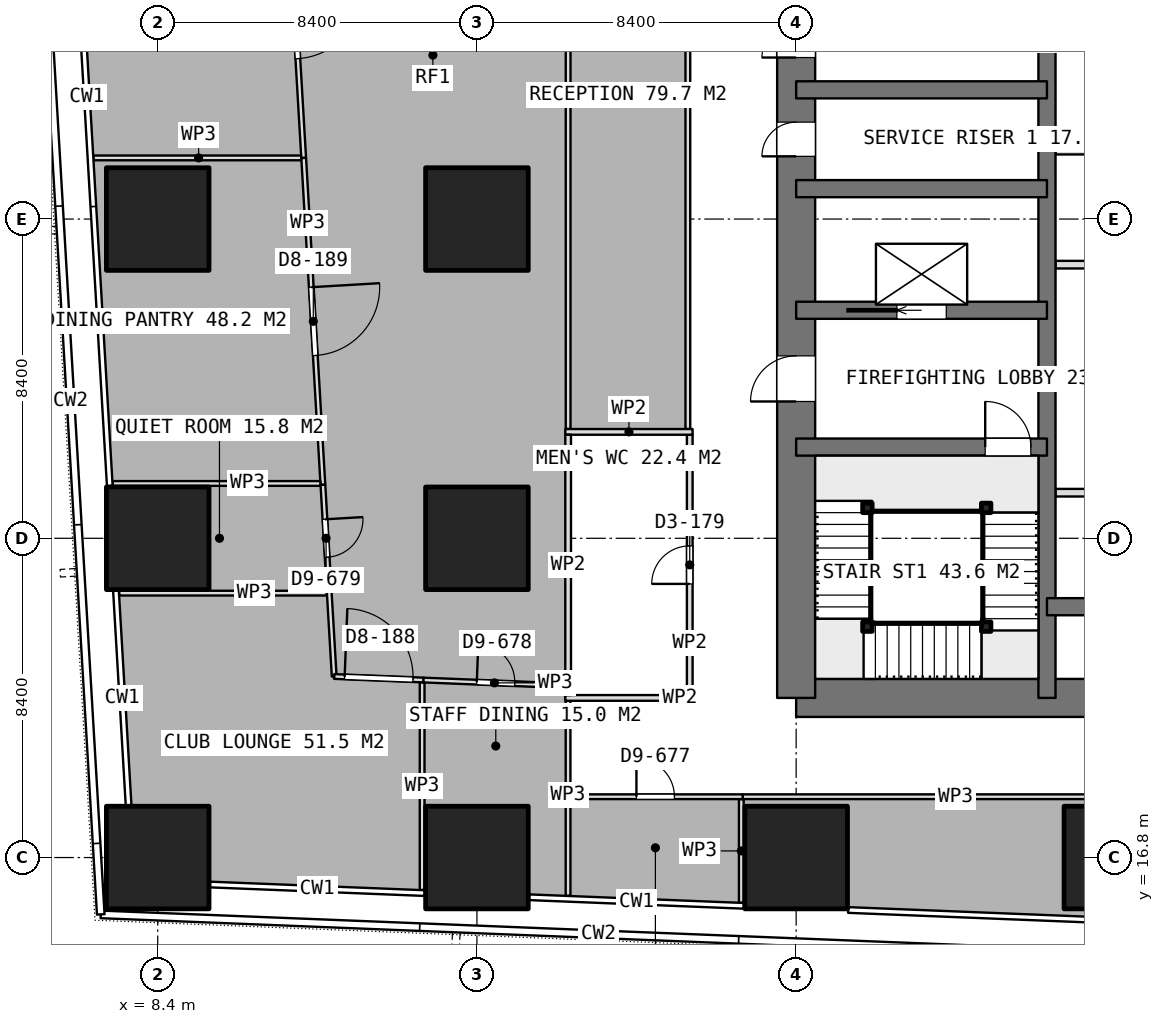
"""IFC4 building model, lengths in metres.
Left out: names, types, materials, properties, quantities, classifications, styles, units other than length and angle.
Written with IfcOpenShell. Run it as: python <this file> out.ifc"""

import sys

from ifc_helpers import new_model, si_unit, direction, frame, frame_2d, origin, origin_2d, place, context, subcontext, project, spatial, rectangle, extrude, element, fill, save


model = new_model("IFC4")
c1 = context("Model", 3, precision=1e-05, world=origin(), true_north=direction((0.0, 1.0)))
c2 = subcontext(c1, "Body", "Model", "MODEL_VIEW")
j1 = project(units=[si_unit("LENGTHUNIT", "METRE"), si_unit("PLANEANGLEUNIT", "RADIAN")], contexts=[c1])
p1 = place(None, origin())
s1 = spatial("IfcSite", under=j1, at=p1, CompositionType="ELEMENT")
p2 = place(p1, origin())
s2 = spatial("IfcBuilding", under=s1, at=p2, CompositionType="ELEMENT")
p3 = place(p2, frame((0.0, 0.0, 172.7)))
s3 = spatial("IfcBuildingStorey", under=s2, at=p3, CompositionType="ELEMENT", Elevation=172.7)
p4 = place(p3, frame((25.2, 21.0, 0.0), z_axis=(0.0, 0.0, 1.0), x_axis=(1.0, 0.0, 0.0)))
e1 = element("IfcWall", 1, at=p4, inside=s3, PredefinedType="SHEAR", context=c2, shape_type="SweptSolid", body=[
    extrude(rectangle(XDim=10.4, YDim=1.0, at=frame_2d((5.2, 0.0))), origin(), (0.0, 0.0, 1.0), 3.75),
])
p5 = place(p3, frame((25.2, 21.0, 0.0), z_axis=(0.0, 0.0, 1.0), x_axis=(0.0, 1.0, 0.0)))
e2 = element("IfcWall", 2, at=p5, inside=s3, PredefinedType="SHEAR", context=c2, shape_type="SweptSolid", body=[
    extrude(rectangle(XDim=25.2, YDim=1.0, at=frame_2d((12.6, 0.0))), origin(), (0.0, 0.0, 1.0), 3.75),
])
p6 = place(p5, frame((7.8, 0.0, 0.0)))
e3 = element("IfcOpeningElement", 3, at=p6, cuts=e2, PredefinedType="OPENING", context=c2, shape_type="SweptSolid", body=[
    extrude(rectangle(XDim=1.2, YDim=2.1, at=frame_2d((0.6, 1.05))), frame((0.0, 0.51, 0.0), z_axis=(0.0, -1.0, 0.0), x_axis=(1.0, 0.0, 0.0)), (0.0, 0.0, 1.0), 1.02),
])
p7 = place(p5, frame((14.25, 0.0, 0.0)))
e4 = element("IfcOpeningElement", 4, at=p7, cuts=e2, PredefinedType="OPENING", context=c2, shape_type="SweptSolid", body=[
    extrude(rectangle(XDim=0.9, YDim=2.1, at=frame_2d((0.45, 1.05))), frame((0.0, 0.51, 0.0), z_axis=(0.0, -1.0, 0.0), x_axis=(1.0, 0.0, 0.0)), (0.0, 0.0, 1.0), 1.02),
])
p8 = place(p5, frame((16.85, 0.0, 0.0)))
e5 = element("IfcOpeningElement", 5, at=p8, cuts=e2, PredefinedType="OPENING", context=c2, shape_type="SweptSolid", body=[
    extrude(rectangle(XDim=0.9, YDim=2.1, at=frame_2d((0.45, 1.05))), frame((0.0, 0.51, 0.0), z_axis=(0.0, -1.0, 0.0), x_axis=(1.0, 0.0, 0.0)), (0.0, 0.0, 1.0), 1.02),
])
p9 = place(p5, frame((19.025, 0.0, 0.0)))
e6 = element("IfcOpeningElement", 6, at=p9, cuts=e2, PredefinedType="OPENING", context=c2, shape_type="SweptSolid", body=[
    extrude(rectangle(XDim=1.2, YDim=2.1, at=frame_2d((0.6, 1.05))), frame((0.0, 0.51, 0.0), z_axis=(0.0, -1.0, 0.0), x_axis=(1.0, 0.0, 0.0)), (0.0, 0.0, 1.0), 1.02),
])
p10 = place(p3, frame((31.8, 21.0, 0.0), z_axis=(0.0, 0.0, 1.0), x_axis=(0.0, 1.0, 0.0)))
e7 = element("IfcWall", 7, at=p10, inside=s3, PredefinedType="SHEAR", context=c2, shape_type="SweptSolid", body=[
    extrude(rectangle(XDim=25.2, YDim=0.45, at=frame_2d((12.6, 0.0))), origin(), (0.0, 0.0, 1.0), 3.75),
])
p11 = place(p3, frame((31.8, 23.4, 0.0), z_axis=(0.0, 0.0, 1.0), x_axis=(1.0, 0.0, 0.0)))
e8 = element("IfcWall", 8, at=p11, inside=s3, PredefinedType="SHEAR", context=c2, shape_type="SweptSolid", body=[
    extrude(rectangle(XDim=3.8, YDim=0.45, at=frame_2d((1.9, 0.0))), origin(), (0.0, 0.0, 1.0), 3.75),
])
p12 = place(p3, frame((25.2, 27.6, 0.0), z_axis=(0.0, 0.0, 1.0), x_axis=(1.0, 0.0, 0.0)))
e9 = element("IfcWall", 9, at=p12, inside=s3, PredefinedType="SHEAR", context=c2, shape_type="SweptSolid", body=[
    extrude(rectangle(XDim=6.6, YDim=0.45, at=frame_2d((3.3, 0.0))), origin(), (0.0, 0.0, 1.0), 3.75),
])
p13 = place(p12, frame((4.975, 0.0, 0.0)))
e10 = element("IfcOpeningElement", 10, at=p13, cuts=e9, PredefinedType="OPENING", context=c2, shape_type="SweptSolid", body=[
    extrude(rectangle(XDim=1.2, YDim=2.1, at=frame_2d((0.6, 1.05))), frame((0.0, 0.235, 0.0), z_axis=(0.0, -1.0, 0.0), x_axis=(1.0, 0.0, 0.0)), (0.0, 0.0, 1.0), 0.47),
])
p14 = place(p3, frame((25.2, 31.2, 0.0), z_axis=(0.0, 0.0, 1.0), x_axis=(1.0, 0.0, 0.0)))
e11 = element("IfcWall", 11, at=p14, inside=s3, PredefinedType="SHEAR", context=c2, shape_type="SweptSolid", body=[
    extrude(rectangle(XDim=6.6, YDim=0.45, at=frame_2d((3.3, 0.0))), origin(), (0.0, 0.0, 1.0), 3.75),
])
p15 = place(p14, frame((2.65, 0.0, 0.0)))
e12 = element("IfcOpeningElement", 12, at=p15, cuts=e11, PredefinedType="OPENING", context=c2, shape_type="SweptSolid", body=[
    extrude(rectangle(XDim=1.3, YDim=2.1, at=frame_2d((0.65, 1.05))), frame((0.0, 0.235, 0.0), z_axis=(0.0, -1.0, 0.0), x_axis=(1.0, 0.0, 0.0)), (0.0, 0.0, 1.0), 0.47),
])
for number, where, z_axis, x_axis in (
    (13, (25.2, 34.4, 0.0), (0.0, 0.0, 1.0), (1.0, 0.0, 0.0)),
    (14, (25.2, 37.0, 0.0), (0.0, 0.0, 1.0), (1.0, 0.0, 0.0)),
):
    element("IfcWall", number, at=place(p3, frame(where, z_axis=z_axis, x_axis=x_axis)), inside=s3, PredefinedType="SHEAR", context=c2, shape_type="SweptSolid", body=[
        extrude(rectangle(XDim=6.6, YDim=0.45, at=frame_2d((3.3, 0.0))), origin(), (0.0, 0.0, 1.0), 3.75),
    ])
for number, where, z_axis, x_axis in (
    (15, (8.4, 16.8, 0.0), (0.0, 0.0, 1.0), (1.0, 0.0, 0.0)),
    (16, (8.4, 25.2, 0.0), (0.0, 0.0, 1.0), (1.0, 0.0, 0.0)),
    (17, (8.4, 33.6, 0.0), (0.0, 0.0, 1.0), (1.0, 0.0, 0.0)),
    (18, (16.8, 16.8, 0.0), (0.0, 0.0, 1.0), (1.0, 0.0, 0.0)),
    (19, (16.8, 25.2, 0.0), (0.0, 0.0, 1.0), (1.0, 0.0, 0.0)),
    (20, (16.8, 33.6, 0.0), (0.0, 0.0, 1.0), (1.0, 0.0, 0.0)),
    (21, (25.2, 16.8, 0.0), (0.0, 0.0, 1.0), (1.0, 0.0, 0.0)),
    (22, (33.6, 16.8, 0.0), (0.0, 0.0, 1.0), (1.0, 0.0, 0.0)),
):
    element("IfcColumn", number, at=place(p3, frame(where, z_axis=z_axis, x_axis=x_axis)), inside=s3, PredefinedType="COLUMN", context=c2, shape_type="SweptSolid", body=[
        extrude(rectangle(XDim=2.7, YDim=2.7, at=origin_2d()), origin(), (0.0, 0.0, 1.0), 3.75),
    ])
for number, where, z_axis, x_axis in (
    (23, (32.025, 26.4, 0.0), (0.0, 0.0, 1.0), (1.0, 0.0, 0.0)),
    (24, (32.025, 29.4, 0.0), (0.0, 0.0, 1.0), (1.0, 0.0, 0.0)),
    (25, (32.025, 32.4, 0.0), (0.0, 0.0, 1.0), (1.0, 0.0, 0.0)),
    (26, (32.025, 35.4, 0.0), (0.0, 0.0, 1.0), (1.0, 0.0, 0.0)),
):
    element("IfcWall", number, at=place(p3, frame(where, z_axis=z_axis, x_axis=x_axis)), inside=s3, PredefinedType="PARTITIONING", context=c2, shape_type="SweptSolid", body=[
        extrude(rectangle(XDim=3.075, YDim=0.2, at=frame_2d((1.538, 0.0))), origin(), (0.0, 0.0, 1.0), 3.5),
    ])
for number, where, z_axis, x_axis in (
    (27, (19.125, 21.0, 0.0), (0.0, 0.0, 1.0), (1.0, 0.0, 0.0)),
    (28, (19.125, 28.0, 0.0), (0.0, 0.0, 1.0), (1.0, 0.0, 0.0)),
):
    element("IfcWall", number, at=place(p3, frame(where, z_axis=z_axis, x_axis=x_axis)), inside=s3, PredefinedType="PARTITIONING", context=c2, shape_type="SweptSolid", body=[
        extrude(rectangle(XDim=3.35, YDim=0.15, at=frame_2d((1.675, 0.0))), origin(), (0.0, 0.0, 1.0), 3.5),
    ])
p16 = place(p3, frame((19.2, 21.075, 0.0), z_axis=(0.0, 0.0, 1.0), x_axis=(0.0, 1.0, 0.0)))
e29 = element("IfcWall", 29, at=p16, inside=s3, PredefinedType="PARTITIONING", context=c2, shape_type="SweptSolid", body=[
    extrude(rectangle(XDim=6.85, YDim=0.15, at=frame_2d((3.425, 0.0))), origin(), (0.0, 0.0, 1.0), 3.5),
])
p17 = place(p3, frame((22.4, 21.075, 0.0), z_axis=(0.0, 0.0, 1.0), x_axis=(0.0, 1.0, 0.0)))
e30 = element("IfcWall", 30, at=p17, inside=s3, PredefinedType="PARTITIONING", context=c2, shape_type="SweptSolid", body=[
    extrude(rectangle(XDim=6.85, YDim=0.15, at=frame_2d((3.425, 0.0))), origin(), (0.0, 0.0, 1.0), 3.5),
])
p18 = place(p17, frame((2.925, 0.0, 0.0)))
e31 = element("IfcOpeningElement", 31, at=p18, cuts=e30, PredefinedType="OPENING", context=c2, shape_type="SweptSolid", body=[
    extrude(rectangle(XDim=1.0, YDim=2.1, at=frame_2d((0.5, 1.05))), frame((0.0, 0.085, 0.0), z_axis=(0.0, -1.0, 0.0), x_axis=(1.0, 0.0, 0.0)), (0.0, 0.0, 1.0), 0.17),
])
p19 = place(p3, frame((23.757, 15.612, 0.0), z_axis=(0.0, 0.0, 1.0), x_axis=(0.0, 1.0, 0.0)))
e32 = element("IfcWall", 32, at=p19, inside=s3, PredefinedType="PARTITIONING", context=c2, shape_type="SweptSolid", body=[
    extrude(rectangle(XDim=2.725, YDim=0.125, at=frame_2d((1.362, 0.0))), origin(), (0.0, 0.0, 1.0), 3.5),
])
p20 = place(p3, frame((23.793, 18.4, 0.0), z_axis=(0.0, 0.0, 1.0), x_axis=(1.0, 0.0, 0.0)))
e33 = element("IfcWall", 33, at=p20, inside=s3, PredefinedType="PARTITIONING", context=c2, shape_type="SweptSolid", body=[
    extrude(rectangle(XDim=28.018, YDim=0.125, at=frame_2d((14.009, 0.0))), origin(), (0.0, 0.0, 1.0), 3.5),
])
p21 = place(p20, frame((13.109, 0.0, 0.0)))
e34 = element("IfcOpeningElement", 34, at=p21, cuts=e33, PredefinedType="OPENING", context=c2, shape_type="SweptSolid", body=[
    extrude(rectangle(XDim=1.8, YDim=2.1, at=frame_2d((0.9, 1.05))), frame((0.0, 0.073, 0.0), z_axis=(0.0, -1.0, 0.0), x_axis=(1.0, 0.0, 0.0)), (0.0, 0.0, 1.0), 0.145),
])
p22 = place(p3, frame((12.241, 35.209, 0.0), z_axis=(0.0, 0.0, 1.0), x_axis=(-1.0, 0.0, 0.0)))
e35 = element("IfcWall", 35, at=p22, inside=s3, PredefinedType="PARTITIONING", context=c2, shape_type="SweptSolid", body=[
    extrude(rectangle(XDim=5.53, YDim=0.125, at=frame_2d((2.765, 0.0))), origin(), (0.0, 0.0, 1.0), 3.5),
])
p23 = place(p3, frame((11.828, 42.232, 0.0), z_axis=(0.0, 0.0, 1.0), x_axis=(0.05871795329, -0.9982746125, 0.0)))
e36 = element("IfcWall", 36, at=p23, inside=s3, PredefinedType="PARTITIONING", context=c2, shape_type="SweptSolid", body=[
    extrude(rectangle(XDim=7.035, YDim=0.125, at=frame_2d((3.518, 0.0))), origin(), (0.0, 0.0, 1.0), 3.5),
])
p24 = place(p23, frame((2.618, 0.0, 0.0)))
e37 = element("IfcOpeningElement", 37, at=p24, cuts=e36, PredefinedType="OPENING", context=c2, shape_type="SweptSolid", body=[
    extrude(rectangle(XDim=1.8, YDim=2.1, at=frame_2d((0.9, 1.05))), frame((0.0, 0.073, 0.0), z_axis=(0.0, -1.0, 0.0), x_axis=(1.0, 0.0, 0.0)), (0.0, 0.0, 1.0), 0.145),
])
p25 = place(p3, frame((12.241, 35.208, 0.0), z_axis=(0.0, 0.0, 1.0), x_axis=(0.058746940791, -0.998272907049, 0.0)))
e38 = element("IfcWall", 38, at=p25, inside=s3, PredefinedType="PARTITIONING", context=c2, shape_type="SweptSolid", body=[
    extrude(rectangle(XDim=8.615, YDim=0.125, at=frame_2d((4.308, 0.0))), origin(), (0.0, 0.0, 1.0), 3.5),
])
p26 = place(p25, frame((3.407, 0.0, 0.0)))
e39 = element("IfcOpeningElement", 39, at=p26, cuts=e38, PredefinedType="OPENING", context=c2, shape_type="SweptSolid", body=[
    extrude(rectangle(XDim=1.8, YDim=2.1, at=frame_2d((0.9, 1.05))), frame((0.0, 0.073, 0.0), z_axis=(0.0, -1.0, 0.0), x_axis=(1.0, 0.0, 0.0)), (0.0, 0.0, 1.0), 0.145),
])
p27 = place(p3, frame((12.682, 26.643, 0.0), z_axis=(0.0, 0.0, 1.0), x_axis=(-1.0, 0.0, 0.0)))
e40 = element("IfcWall", 40, at=p27, inside=s3, PredefinedType="PARTITIONING", context=c2, shape_type="SweptSolid", body=[
    extrude(rectangle(XDim=5.466, YDim=0.125, at=frame_2d((2.733, 0.0))), origin(), (0.0, 0.0, 1.0), 3.5),
])
p28 = place(p3, frame((12.747, 26.607, 0.0), z_axis=(0.0, 0.0, 1.0), x_axis=(0.058894643304, -0.998264204001, 0.0)))
e41 = element("IfcWall", 41, at=p28, inside=s3, PredefinedType="PARTITIONING", context=c2, shape_type="SweptSolid", body=[
    extrude(rectangle(XDim=2.819, YDim=0.125, at=frame_2d((1.409, 0.0))), origin(), (0.0, 0.0, 1.0), 3.5),
])
p29 = place(p28, frame((0.909, 0.0, 0.0)))
e42 = element("IfcOpeningElement", 42, at=p29, cuts=e41, PredefinedType="OPENING", context=c2, shape_type="SweptSolid", body=[
    extrude(rectangle(XDim=1.0, YDim=2.1, at=frame_2d((0.5, 1.05))), frame((0.0, 0.073, 0.0), z_axis=(0.0, -1.0, 0.0), x_axis=(1.0, 0.0, 0.0)), (0.0, 0.0, 1.0), 0.145),
])
p30 = place(p3, frame((12.852, 23.757, 0.0), z_axis=(0.0, 0.0, 1.0), x_axis=(-1.0, 0.0, 0.0)))
e43 = element("IfcWall", 43, at=p30, inside=s3, PredefinedType="PARTITIONING", context=c2, shape_type="SweptSolid", body=[
    extrude(rectangle(XDim=5.466, YDim=0.125, at=frame_2d((2.733, 0.0))), origin(), (0.0, 0.0, 1.0), 3.5),
])
p31 = place(p3, frame((15.358, 21.41, 0.0), z_axis=(0.0, 0.0, 1.0), x_axis=(0.0, -1.0, 0.0)))
e44 = element("IfcWall", 44, at=p31, inside=s3, PredefinedType="PARTITIONING", context=c2, shape_type="SweptSolid", body=[
    extrude(rectangle(XDim=5.462, YDim=0.125, at=frame_2d((2.731, 0.0))), origin(), (0.0, 0.0, 1.0), 3.5),
])
p32 = place(p3, frame((12.913, 23.792, 0.0), z_axis=(0.0, 0.0, 1.0), x_axis=(0.058632247686, -0.998279649964, 0.0)))
e45 = element("IfcWall", 45, at=p32, inside=s3, PredefinedType="PARTITIONING", context=c2, shape_type="SweptSolid", body=[
    extrude(rectangle(XDim=2.232, YDim=0.125, at=frame_2d((1.116, 0.0))), origin(), (0.0, 0.0, 1.0), 3.5),
])
p33 = place(p3, frame((13.044, 21.564, 0.0), z_axis=(0.0, 0.0, 1.0), x_axis=(0.999216969068, -0.039565751945, 0.0)))
e46 = element("IfcWall", 46, at=p33, inside=s3, PredefinedType="PARTITIONING", context=c2, shape_type="SweptSolid", body=[
    extrude(rectangle(XDim=2.351, YDim=0.125, at=frame_2d((1.176, 0.0))), origin(), (0.0, 0.0, 1.0), 3.5),
])
p34 = place(p33, frame((0.275, 0.0, 0.0)))
e47 = element("IfcOpeningElement", 47, at=p34, cuts=e46, PredefinedType="OPENING", context=c2, shape_type="SweptSolid", body=[
    extrude(rectangle(XDim=1.8, YDim=2.1, at=frame_2d((0.9, 1.05))), frame((0.0, 0.073, 0.0), z_axis=(0.0, -1.0, 0.0), x_axis=(1.0, 0.0, 0.0)), (0.0, 0.0, 1.0), 0.145),
])
p35 = place(p3, frame((15.394, 21.47, 0.0), z_axis=(0.0, 0.0, 1.0), x_axis=(0.999214686539, -0.039623354276, 0.0)))
e48 = element("IfcWall", 48, at=p35, inside=s3, PredefinedType="PARTITIONING", context=c2, shape_type="SweptSolid", body=[
    extrude(rectangle(XDim=3.734, YDim=0.125, at=frame_2d((1.867, 0.0))), origin(), (0.0, 0.0, 1.0), 3.5),
])
p36 = place(p35, frame((1.403, 0.0, 0.0)))
e49 = element("IfcOpeningElement", 49, at=p36, cuts=e48, PredefinedType="OPENING", context=c2, shape_type="SweptSolid", body=[
    extrude(rectangle(XDim=1.0, YDim=2.1, at=frame_2d((0.5, 1.05))), frame((0.0, 0.073, 0.0), z_axis=(0.0, -1.0, 0.0), x_axis=(1.0, 0.0, 0.0)), (0.0, 0.0, 1.0), 0.145),
])
p37 = place(p3, frame((19.198, 21.074, 0.0), z_axis=(0.0, 0.0, 1.0), x_axis=(0.0, -1.0, 0.0)))
e50 = element("IfcWall", 50, at=p37, inside=s3, PredefinedType="PARTITIONING", context=c2, shape_type="SweptSolid", body=[
    extrude(rectangle(XDim=5.28, YDim=0.125, at=frame_2d((2.64, 0.0))), origin(), (0.0, 0.0, 1.0), 3.5),
])
p38 = place(p3, frame((19.261, 18.4, 0.0), z_axis=(0.0, 0.0, 1.0), x_axis=(1.0, 0.0, 0.0)))
e51 = element("IfcWall", 51, at=p38, inside=s3, PredefinedType="PARTITIONING", context=c2, shape_type="SweptSolid", body=[
    extrude(rectangle(XDim=4.532, YDim=0.125, at=frame_2d((2.266, 0.0))), origin(), (0.0, 0.0, 1.0), 3.5),
])
p39 = place(p38, frame((1.736, 0.0, 0.0)))
e52 = element("IfcOpeningElement", 52, at=p39, cuts=e51, PredefinedType="OPENING", context=c2, shape_type="SweptSolid", body=[
    extrude(rectangle(XDim=1.0, YDim=2.1, at=frame_2d((0.5, 1.05))), frame((0.0, 0.073, 0.0), z_axis=(0.0, -1.0, 0.0), x_axis=(1.0, 0.0, 0.0)), (0.0, 0.0, 1.0), 0.145),
])
p40 = place(p3, frame((19.2, 28.075, 0.0), z_axis=(0.0, 0.0, 1.0), x_axis=(0.0, 1.0, 0.0)))
e53 = element("IfcWall", 53, at=p40, inside=s3, PredefinedType="PARTITIONING", context=c2, shape_type="SweptSolid", body=[
    extrude(rectangle(XDim=25.225, YDim=0.125, at=frame_2d((12.613, 0.0))), origin(), (0.0, 0.0, 1.0), 3.5),
])
p41 = place(p3, frame((22.35, 53.3, 0.0), z_axis=(0.0, 0.0, 1.0), x_axis=(0.0, -1.0, 0.0)))
e54 = element("IfcWall", 54, at=p41, inside=s3, PredefinedType="PARTITIONING", context=c2, shape_type="SweptSolid", body=[
    extrude(rectangle(XDim=25.225, YDim=0.125, at=frame_2d((12.613, 0.0))), origin(), (0.0, 0.0, 1.0), 3.5),
])
p42 = place(p41, frame((11.75, 0.0, 0.0)))
e55 = element("IfcOpeningElement", 55, at=p42, cuts=e54, PredefinedType="OPENING", context=c2, shape_type="SweptSolid", body=[
    extrude(rectangle(XDim=1.8, YDim=2.1, at=frame_2d((0.9, 1.05))), frame((0.0, 0.073, 0.0), z_axis=(0.0, -1.0, 0.0), x_axis=(1.0, 0.0, 0.0)), (0.0, 0.0, 1.0), 0.145),
])
for number, where, z_axis, x_axis in (
    (56, (30.2, 26.0, 0.0), (0.0, 0.0, 1.0), (1.0, 0.0, 0.0)),
    (57, (30.2, 22.875, 0.0), (0.0, 0.0, 1.0), (1.0, 0.0, 0.0)),
    (58, (27.075, 22.875, 0.0), (0.0, 0.0, 1.0), (1.0, 0.0, 0.0)),
    (59, (27.075, 26.0, 0.0), (0.0, 0.0, 1.0), (1.0, 0.0, 0.0)),
):
    element("IfcColumn", number, at=place(p3, frame(where, z_axis=z_axis, x_axis=x_axis)), inside=s3, PredefinedType="COLUMN", context=c2, shape_type="SweptSolid", body=[
        extrude(rectangle(XDim=0.25, YDim=0.25, at=origin_2d()), origin(), (0.0, 0.0, 1.0), 3.75),
    ])
p43 = place(p6, origin())
e60 = element("IfcDoor", 60, at=p43, inside=s3, OperationType="SINGLE_SWING_LEFT", PredefinedType="DOOR", context=c2, shape_type="SweptSolid", body=[
    extrude(rectangle(XDim=1.2, YDim=2.1, at=frame_2d((0.6, 1.05))), frame((0.0, 0.025, 0.0), z_axis=(0.0, -1.0, 0.0), x_axis=(1.0, 0.0, 0.0)), (0.0, 0.0, 1.0), 0.05),
])
fill(e3, e60)
p44 = place(p7, origin())
e61 = element("IfcDoor", 61, at=p44, inside=s3, OperationType="SINGLE_SWING_LEFT", PredefinedType="DOOR", context=c2, shape_type="SweptSolid", body=[
    extrude(rectangle(XDim=0.9, YDim=2.1, at=frame_2d((0.45, 1.05))), frame((0.0, 0.025, 0.0), z_axis=(0.0, -1.0, 0.0), x_axis=(1.0, 0.0, 0.0)), (0.0, 0.0, 1.0), 0.05),
])
fill(e4, e61)
p45 = place(p8, origin())
e62 = element("IfcDoor", 62, at=p45, inside=s3, OperationType="SINGLE_SWING_LEFT", PredefinedType="DOOR", context=c2, shape_type="SweptSolid", body=[
    extrude(rectangle(XDim=0.9, YDim=2.1, at=frame_2d((0.45, 1.05))), frame((0.0, 0.025, 0.0), z_axis=(0.0, -1.0, 0.0), x_axis=(1.0, 0.0, 0.0)), (0.0, 0.0, 1.0), 0.05),
])
fill(e5, e62)
p46 = place(p15, origin())
e63 = element("IfcDoor", 63, at=p46, inside=s3, OperationType="SLIDING_TO_LEFT", PredefinedType="USERDEFINED", context=c2, shape_type="SweptSolid", body=[
    extrude(rectangle(XDim=1.3, YDim=2.1, at=frame_2d((0.65, 1.05))), frame((0.0, 0.025, 0.0), z_axis=(0.0, -1.0, 0.0), x_axis=(1.0, 0.0, 0.0)), (0.0, 0.0, 1.0), 0.05),
])
fill(e12, e63)
p47 = place(p18, origin())
e64 = element("IfcDoor", 64, at=p47, inside=s3, OperationType="SINGLE_SWING_LEFT", PredefinedType="DOOR", context=c2, shape_type="SweptSolid", body=[
    extrude(rectangle(XDim=1.0, YDim=2.1, at=frame_2d((0.5, 1.05))), frame((0.0, 0.025, 0.0), z_axis=(0.0, -1.0, 0.0), x_axis=(1.0, 0.0, 0.0)), (0.0, 0.0, 1.0), 0.05),
])
fill(e31, e64)
p48 = place(p24, origin())
e65 = element("IfcDoor", 65, at=p48, inside=s3, OperationType="DOUBLE_DOOR_SINGLE_SWING", PredefinedType="DOOR", context=c2, shape_type="SweptSolid", body=[
    extrude(rectangle(XDim=1.8, YDim=2.1, at=frame_2d((0.9, 1.05))), frame((0.0, 0.025, 0.0), z_axis=(0.0, -1.0, 0.0), x_axis=(1.0, 0.0, 0.0)), (0.0, 0.0, 1.0), 0.05),
])
fill(e37, e65)
p49 = place(p26, origin())
e66 = element("IfcDoor", 66, at=p49, inside=s3, OperationType="DOUBLE_DOOR_SINGLE_SWING", PredefinedType="DOOR", context=c2, shape_type="SweptSolid", body=[
    extrude(rectangle(XDim=1.8, YDim=2.1, at=frame_2d((0.9, 1.05))), frame((0.0, 0.025, 0.0), z_axis=(0.0, -1.0, 0.0), x_axis=(1.0, 0.0, 0.0)), (0.0, 0.0, 1.0), 0.05),
])
fill(e39, e66)
p50 = place(p29, origin())
e67 = element("IfcDoor", 67, at=p50, inside=s3, OperationType="SINGLE_SWING_LEFT", PredefinedType="DOOR", context=c2, shape_type="SweptSolid", body=[
    extrude(rectangle(XDim=1.0, YDim=2.1, at=frame_2d((0.5, 1.05))), frame((0.0, 0.025, 0.0), z_axis=(0.0, -1.0, 0.0), x_axis=(1.0, 0.0, 0.0)), (0.0, 0.0, 1.0), 0.05),
])
fill(e42, e67)
p51 = place(p34, origin())
e68 = element("IfcDoor", 68, at=p51, inside=s3, OperationType="DOUBLE_DOOR_SINGLE_SWING", PredefinedType="DOOR", context=c2, shape_type="SweptSolid", body=[
    extrude(rectangle(XDim=1.8, YDim=2.1, at=frame_2d((0.9, 1.05))), frame((0.0, 0.025, 0.0), z_axis=(0.0, -1.0, 0.0), x_axis=(1.0, 0.0, 0.0)), (0.0, 0.0, 1.0), 0.05),
])
fill(e47, e68)
p52 = place(p36, origin())
e69 = element("IfcDoor", 69, at=p52, inside=s3, OperationType="SINGLE_SWING_LEFT", PredefinedType="DOOR", context=c2, shape_type="SweptSolid", body=[
    extrude(rectangle(XDim=1.0, YDim=2.1, at=frame_2d((0.5, 1.05))), frame((0.0, 0.025, 0.0), z_axis=(0.0, -1.0, 0.0), x_axis=(1.0, 0.0, 0.0)), (0.0, 0.0, 1.0), 0.05),
])
fill(e49, e69)
p53 = place(p39, origin())
e70 = element("IfcDoor", 70, at=p53, inside=s3, OperationType="SINGLE_SWING_LEFT", PredefinedType="DOOR", context=c2, shape_type="SweptSolid", body=[
    extrude(rectangle(XDim=1.0, YDim=2.1, at=frame_2d((0.5, 1.05))), frame((0.0, 0.025, 0.0), z_axis=(0.0, -1.0, 0.0), x_axis=(1.0, 0.0, 0.0)), (0.0, 0.0, 1.0), 0.05),
])
fill(e52, e70)
p54 = place(p13, origin())
e71 = element("IfcDoor", 71, at=p54, inside=s3, OperationType="SINGLE_SWING_RIGHT", PredefinedType="DOOR", context=c2, shape_type="SweptSolid", body=[
    extrude(rectangle(XDim=1.2, YDim=2.1, at=frame_2d((0.6, 1.05))), frame((0.0, 0.025, 0.0), z_axis=(0.0, -1.0, 0.0), x_axis=(1.0, 0.0, 0.0)), (0.0, 0.0, 1.0), 0.05),
])
fill(e10, e71)
save(model, sys.argv[1])
